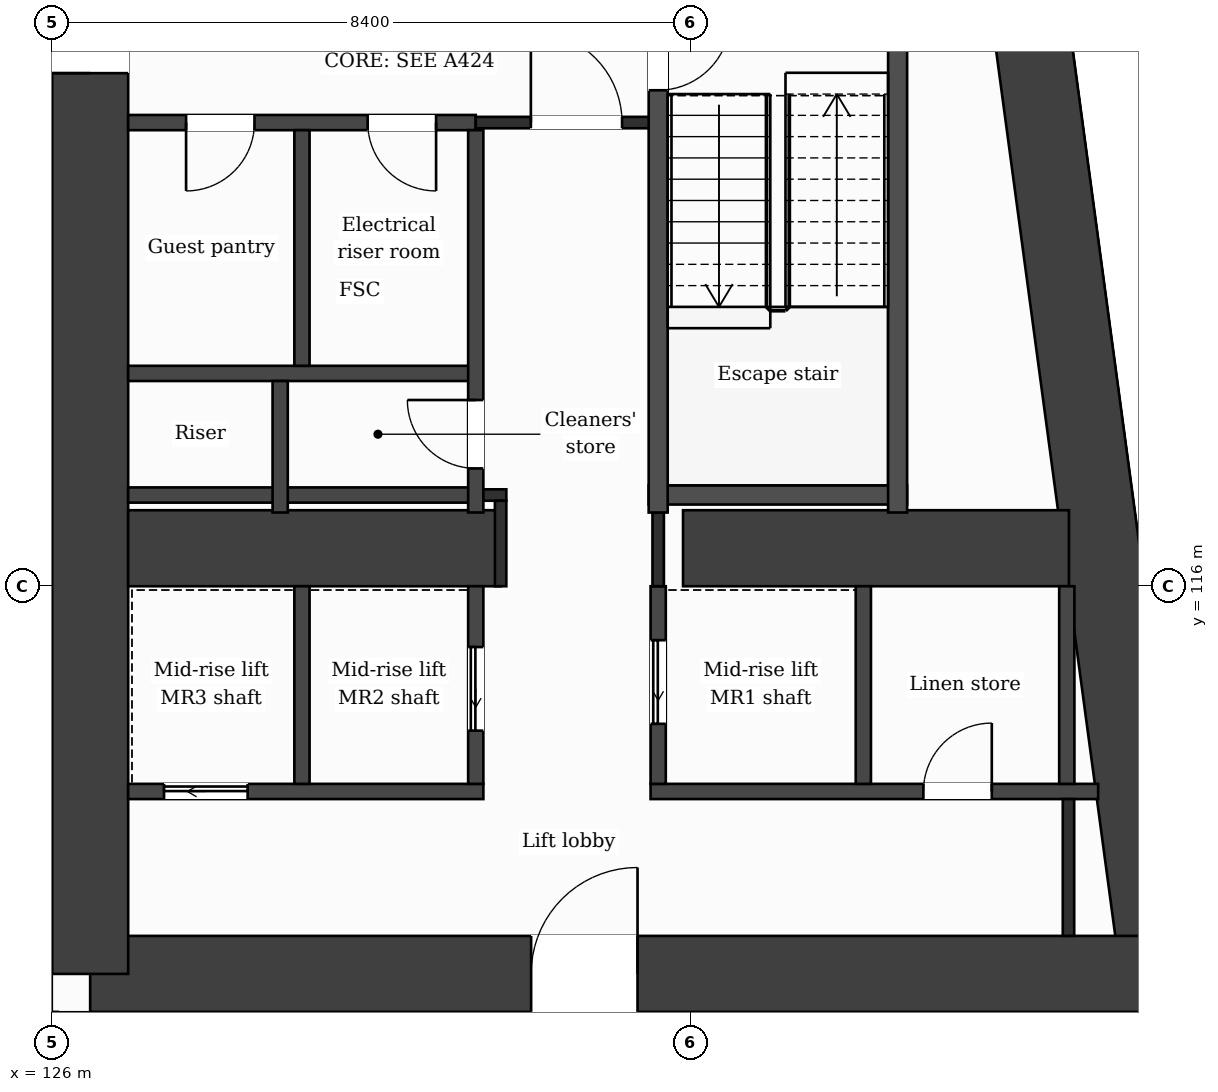
"""IFC4 building model, lengths in metres.
Left out: names, types, materials, properties, quantities, classifications, styles, units other than length and angle.
Written with IfcOpenShell. Run it as: python <this file> out.ifc"""

import sys

from ifc_helpers import new_model, si_unit, direction, frame, frame_2d, origin, place, context, subcontext, project, spatial, rectangle, extrude, element, fill, save


model = new_model("IFC4")
c1 = context("Model", 3, precision=1e-05, world=origin(), true_north=direction((0.0, 1.0)))
c2 = subcontext(c1, "Body", "Model", "MODEL_VIEW")
j1 = project(units=[si_unit("LENGTHUNIT", "METRE"), si_unit("PLANEANGLEUNIT", "RADIAN")], contexts=[c1])
p1 = place(None, origin())
s1 = spatial("IfcSite", under=j1, at=p1, CompositionType="ELEMENT")
p2 = place(p1, origin())
s2 = spatial("IfcBuilding", under=s1, at=p2, CompositionType="ELEMENT")
p3 = place(p2, frame((0.0, 0.0, 102.1)))
s3 = spatial("IfcBuildingStorey", under=s2, at=p3, CompositionType="ELEMENT", Elevation=102.1)
p4 = place(p3, frame((137.732, 131.9, 0.0), z_axis=(0.0, 0.0, 1.0), x_axis=(0.133411141623, -0.991060778808, 0.0)))
e1 = element("IfcWall", 1, at=p4, inside=s3, PredefinedType="SHEAR", context=c2, shape_type="SweptSolid", body=[
    extrude(rectangle(XDim=21.189, YDim=1.0, at=frame_2d((10.595, 0.0))), origin(), (0.0, 0.0, 1.0), 3.7),
])
p5 = place(p3, frame((140.559, 110.9, 0.0), z_axis=(0.0, 0.0, 1.0), x_axis=(-1.0, 0.0, 0.0)))
e2 = element("IfcWall", 2, at=p5, inside=s3, PredefinedType="SHEAR", context=c2, shape_type="SweptSolid", body=[
    extrude(rectangle(XDim=14.059, YDim=1.0, at=frame_2d((7.029, 0.0))), origin(), (0.0, 0.0, 1.0), 3.7),
])
p6 = place(p5, frame((6.858, 0.0, 0.0)))
e3 = element("IfcOpeningElement", 3, at=p6, cuts=e2, PredefinedType="OPENING", context=c2, shape_type="SweptSolid", body=[
    extrude(rectangle(XDim=1.4, YDim=2.1, at=frame_2d((0.7, 1.05))), frame((0.0, 0.51, 0.0), z_axis=(0.0, -1.0, 0.0), x_axis=(1.0, 0.0, 0.0)), (0.0, 0.0, 1.0), 1.02),
])
p7 = place(p3, frame((126.5, 110.9, 0.0), z_axis=(0.0, 0.0, 1.0), x_axis=(0.0, 1.0, 0.0)))
e4 = element("IfcWall", 4, at=p7, inside=s3, PredefinedType="SHEAR", context=c2, shape_type="SweptSolid", body=[
    extrude(rectangle(XDim=21.0, YDim=1.0, at=frame_2d((10.5, 0.0))), origin(), (0.0, 0.0, 1.0), 3.7),
])
p8 = place(p7, frame((11.85, 0.0, 0.0)))
e5 = element("IfcOpeningElement", 5, at=p8, cuts=e4, PredefinedType="OPENING", context=c2, shape_type="SweptSolid", body=[
    extrude(rectangle(XDim=1.4, YDim=2.1, at=frame_2d((0.7, 1.05))), frame((0.0, 0.51, 0.0), z_axis=(0.0, -1.0, 0.0), x_axis=(1.0, 0.0, 0.0)), (0.0, 0.0, 1.0), 1.02),
])
p9 = place(p3, frame((127.0, 116.5, 0.0), z_axis=(0.0, 0.0, 1.0), x_axis=(1.0, 0.0, 0.0)))
e6 = element("IfcWall", 6, at=p9, inside=s3, PredefinedType="SHEAR", context=c2, shape_type="SweptSolid", body=[
    extrude(rectangle(XDim=4.9, YDim=1.0, at=frame_2d((2.45, 0.0))), origin(), (0.0, 0.0, 1.0), 3.7),
])
p10 = place(p3, frame((134.3, 116.5, 0.0), z_axis=(0.0, 0.0, 1.0), x_axis=(1.0, 0.0, 0.0)))
e7 = element("IfcWall", 7, at=p10, inside=s3, PredefinedType="SHEAR", context=c2, shape_type="SweptSolid", body=[
    extrude(rectangle(XDim=5.077, YDim=1.0, at=frame_2d((2.539, 0.0))), origin(), (0.0, 0.0, 1.0), 3.7),
])
p11 = place(p3, frame((140.348, 103.85, 0.0), z_axis=(0.0, 0.0, 1.0), x_axis=(-0.133431549479, 0.991058031401, 0.0)))
e8 = element("IfcWall", 8, at=p11, inside=s3, PredefinedType="SOLIDWALL", context=c2, shape_type="SweptSolid", body=[
    extrude(rectangle(XDim=6.609, YDim=0.3, at=frame_2d((3.304, 0.0))), origin(), (0.0, 0.0, 1.0), 3.38),
])
p12 = place(p11, frame((0.737, 0.0, 0.9)))
e9 = element("IfcOpeningElement", 9, at=p12, cuts=e8, PredefinedType="OPENING", context=c2, shape_type="SweptSolid", body=[
    extrude(rectangle(XDim=1.2, YDim=2.1, at=frame_2d((0.6, 1.05))), frame((0.0, 0.16, 0.0), z_axis=(0.0, -1.0, 0.0), x_axis=(1.0, 0.0, 0.0)), (0.0, 0.0, 1.0), 0.32),
])
p13 = place(p11, frame((3.991, 0.0, 0.0)))
e10 = element("IfcOpeningElement", 10, at=p13, cuts=e8, PredefinedType="OPENING", context=c2, shape_type="SweptSolid", body=[
    extrude(rectangle(XDim=1.2, YDim=2.4, at=frame_2d((0.6, 1.2))), frame((0.0, 0.16, 0.0), z_axis=(0.0, -1.0, 0.0), x_axis=(1.0, 0.0, 0.0)), (0.0, 0.0, 1.0), 0.32),
])
p14 = place(p3, frame((127.0, 113.3, 0.0), z_axis=(0.0, 0.0, 1.0), x_axis=(1.0, 0.0, 0.0)))
e11 = element("IfcWall", 11, at=p14, inside=s3, PredefinedType="PARTITIONING", context=c2, shape_type="SweptSolid", body=[
    extrude(rectangle(XDim=4.673, YDim=0.2, at=frame_2d((2.336, 0.0))), origin(), (0.0, 0.0, 1.0), 3.38),
])
p15 = place(p14, frame((0.472, 0.0, 0.0)))
e12 = element("IfcOpeningElement", 12, at=p15, cuts=e11, PredefinedType="OPENING", context=c2, shape_type="SweptSolid", body=[
    extrude(rectangle(XDim=1.1, YDim=2.1, at=frame_2d((0.55, 1.05))), frame((0.0, 0.11, 0.0), z_axis=(0.0, -1.0, 0.0), x_axis=(1.0, 0.0, 0.0)), (0.0, 0.0, 1.0), 0.22),
])
p16 = place(p3, frame((133.873, 113.3, 0.0), z_axis=(0.0, 0.0, 1.0), x_axis=(1.0, 0.0, 0.0)))
e13 = element("IfcWall", 13, at=p16, inside=s3, PredefinedType="PARTITIONING", context=c2, shape_type="SweptSolid", body=[
    extrude(rectangle(XDim=5.888, YDim=0.2, at=frame_2d((2.944, 0.0))), origin(), (0.0, 0.0, 1.0), 3.38),
])
p17 = place(p16, frame((3.589, 0.0, 0.0)))
e14 = element("IfcOpeningElement", 14, at=p17, cuts=e13, PredefinedType="OPENING", context=c2, shape_type="SweptSolid", body=[
    extrude(rectangle(XDim=0.9, YDim=2.1, at=frame_2d((0.45, 1.05))), frame((0.0, 0.11, 0.0), z_axis=(0.0, -1.0, 0.0), x_axis=(1.0, 0.0, 0.0)), (0.0, 0.0, 1.0), 0.22),
])
p18 = place(p3, frame((127.0, 117.2, 0.0), z_axis=(0.0, 0.0, 1.0), x_axis=(1.0, 0.0, 0.0)))
e15 = element("IfcWall", 15, at=p18, inside=s3, PredefinedType="PARTITIONING", context=c2, shape_type="SweptSolid", body=[
    extrude(rectangle(XDim=4.573, YDim=0.2, at=frame_2d((2.287, 0.0))), origin(), (0.0, 0.0, 1.0), 3.38),
])
p19 = place(p3, frame((131.573, 117.2, 0.0), z_axis=(0.0, 0.0, 1.0), x_axis=(1.0, 0.0, 0.0)))
e16 = element("IfcWall", 16, at=p19, inside=s3, PredefinedType="PARTITIONING", context=c2, shape_type="SweptSolid", body=[
    extrude(rectangle(XDim=0.402, YDim=0.15, at=frame_2d((0.201, 0.0))), origin(), (0.0, 0.0, 1.0), 3.38),
])
p20 = place(p3, frame((133.848, 117.2, 0.0), z_axis=(0.0, 0.0, 1.0), x_axis=(1.0, 0.0, 0.0)))
e17 = element("IfcWall", 17, at=p20, inside=s3, PredefinedType="PARTITIONING", context=c2, shape_type="SweptSolid", body=[
    extrude(rectangle(XDim=3.4, YDim=0.25, at=frame_2d((1.7, 0.0))), origin(), (0.0, 0.0, 1.0), 3.38),
])
p21 = place(p3, frame((127.0, 118.8, 0.0), z_axis=(0.0, 0.0, 1.0), x_axis=(1.0, 0.0, 0.0)))
e18 = element("IfcWall", 18, at=p21, inside=s3, PredefinedType="PARTITIONING", context=c2, shape_type="SweptSolid", body=[
    extrude(rectangle(XDim=4.573, YDim=0.2, at=frame_2d((2.287, 0.0))), origin(), (0.0, 0.0, 1.0), 3.38),
])
p22 = place(p3, frame((127.0, 122.1, 0.0), z_axis=(0.0, 0.0, 1.0), x_axis=(1.0, 0.0, 0.0)))
e19 = element("IfcWall", 19, at=p22, inside=s3, PredefinedType="PARTITIONING", context=c2, shape_type="SweptSolid", body=[
    extrude(rectangle(XDim=4.573, YDim=0.2, at=frame_2d((2.287, 0.0))), origin(), (0.0, 0.0, 1.0), 3.38),
])
p23 = place(p22, frame((3.151, 0.0, 0.0)))
e20 = element("IfcOpeningElement", 20, at=p23, cuts=e19, PredefinedType="OPENING", context=c2, shape_type="SweptSolid", body=[
    extrude(rectangle(XDim=0.9, YDim=2.1, at=frame_2d((0.45, 1.05))), frame((0.0, 0.11, 0.0), z_axis=(0.0, -1.0, 0.0), x_axis=(1.0, 0.0, 0.0)), (0.0, 0.0, 1.0), 0.22),
])
p24 = place(p22, frame((0.762, 0.0, 0.0)))
e21 = element("IfcOpeningElement", 21, at=p24, cuts=e19, PredefinedType="OPENING", context=c2, shape_type="SweptSolid", body=[
    extrude(rectangle(XDim=0.9, YDim=2.1, at=frame_2d((0.45, 1.05))), frame((0.0, 0.11, 0.0), z_axis=(0.0, -1.0, 0.0), x_axis=(1.0, 0.0, 0.0)), (0.0, 0.0, 1.0), 0.22),
])
p25 = place(p3, frame((131.573, 122.1, 0.0), z_axis=(0.0, 0.0, 1.0), x_axis=(1.0, 0.0, 0.0)))
e22 = element("IfcWall", 22, at=p25, inside=s3, PredefinedType="PARTITIONING", context=c2, shape_type="SweptSolid", body=[
    extrude(rectangle(XDim=2.4, YDim=0.15, at=frame_2d((1.2, 0.0))), origin(), (0.0, 0.0, 1.0), 3.38),
])
p26 = place(p25, frame((0.725, 0.0, 0.0)))
e23 = element("IfcOpeningElement", 23, at=p26, cuts=e22, PredefinedType="OPENING", context=c2, shape_type="SweptSolid", body=[
    extrude(rectangle(XDim=1.2, YDim=2.1, at=frame_2d((0.6, 1.05))), frame((0.0, 0.085, 0.0), z_axis=(0.0, -1.0, 0.0), x_axis=(1.0, 0.0, 0.0)), (0.0, 0.0, 1.0), 0.17),
])
p27 = place(p3, frame((100.8, 122.45, 0.0), z_axis=(0.0, 0.0, 1.0), x_axis=(1.0, 0.0, 0.0)))
e24 = element("IfcWall", 24, at=p27, inside=s3, PredefinedType="PARTITIONING", context=c2, shape_type="SweptSolid", body=[
    extrude(rectangle(XDim=25.2, YDim=0.15, at=frame_2d((12.6, 0.0))), origin(), (0.0, 0.0, 1.0), 3.38),
])
p28 = place(p3, frame((126.0, 109.075, 0.0), z_axis=(0.0, 0.0, 1.0), x_axis=(0.0, 1.0, 0.0)))
e25 = element("IfcWall", 25, at=p28, inside=s3, PredefinedType="PARTITIONING", context=c2, shape_type="SweptSolid", body=[
    extrude(rectangle(XDim=1.325, YDim=0.15, at=frame_2d((0.663, 0.0))), origin(), (0.0, 0.0, 1.0), 3.38),
])
p29 = place(p3, frame((129.0, 116.97, 0.0), z_axis=(0.0, 0.0, 1.0), x_axis=(0.0, 1.0, 0.0)))
e26 = element("IfcWall", 26, at=p29, inside=s3, PredefinedType="PARTITIONING", context=c2, shape_type="SweptSolid", body=[
    extrude(rectangle(XDim=1.73, YDim=0.2, at=frame_2d((0.865, 0.0))), origin(), (0.0, 0.0, 1.0), 3.38),
])
p30 = place(p3, frame((129.287, 113.4, 0.0), z_axis=(0.0, 0.0, 1.0), x_axis=(0.0, 1.0, 0.0)))
e27 = element("IfcWall", 27, at=p30, inside=s3, PredefinedType="PARTITIONING", context=c2, shape_type="SweptSolid", body=[
    extrude(rectangle(XDim=2.6, YDim=0.2, at=frame_2d((1.3, 0.0))), origin(), (0.0, 0.0, 1.0), 3.38),
])
p31 = place(p3, frame((129.287, 118.9, 0.0), z_axis=(0.0, 0.0, 1.0), x_axis=(0.0, 1.0, 0.0)))
e28 = element("IfcWall", 28, at=p31, inside=s3, PredefinedType="PARTITIONING", context=c2, shape_type="SweptSolid", body=[
    extrude(rectangle(XDim=3.1, YDim=0.2, at=frame_2d((1.55, 0.0))), origin(), (0.0, 0.0, 1.0), 3.38),
])
p32 = place(p3, frame((131.573, 113.4, 0.0), z_axis=(0.0, 0.0, 1.0), x_axis=(0.0, 1.0, 0.0)))
e29 = element("IfcWall", 29, at=p32, inside=s3, PredefinedType="PARTITIONING", context=c2, shape_type="SweptSolid", body=[
    extrude(rectangle(XDim=2.6, YDim=0.2, at=frame_2d((1.3, 0.0))), origin(), (0.0, 0.0, 1.0), 3.38),
])
p33 = place(p32, frame((0.7, 0.0, 0.0)))
e30 = element("IfcOpeningElement", 30, at=p33, cuts=e29, PredefinedType="OPENING", context=c2, shape_type="SweptSolid", body=[
    extrude(rectangle(XDim=1.1, YDim=2.1, at=frame_2d((0.55, 1.05))), frame((0.0, 0.11, 0.0), z_axis=(0.0, -1.0, 0.0), x_axis=(1.0, 0.0, 0.0)), (0.0, 0.0, 1.0), 0.22),
])
p34 = place(p3, frame((131.573, 116.97, 0.0), z_axis=(0.0, 0.0, 1.0), x_axis=(0.0, 1.0, 0.0)))
e31 = element("IfcWall", 31, at=p34, inside=s3, PredefinedType="PARTITIONING", context=c2, shape_type="SweptSolid", body=[
    extrude(rectangle(XDim=5.03, YDim=0.2, at=frame_2d((2.515, 0.0))), origin(), (0.0, 0.0, 1.0), 3.38),
])
p35 = place(p34, frame((0.58, 0.0, 0.0)))
e32 = element("IfcOpeningElement", 32, at=p35, cuts=e31, PredefinedType="OPENING", context=c2, shape_type="SweptSolid", body=[
    extrude(rectangle(XDim=0.9, YDim=2.1, at=frame_2d((0.45, 1.05))), frame((0.0, 0.11, 0.0), z_axis=(0.0, -1.0, 0.0), x_axis=(1.0, 0.0, 0.0)), (0.0, 0.0, 1.0), 0.22),
])
p36 = place(p3, frame((131.9, 116.0, 0.0), z_axis=(0.0, 0.0, 1.0), x_axis=(0.0, 1.0, 0.0)))
e33 = element("IfcWall", 33, at=p36, inside=s3, PredefinedType="PARTITIONING", context=c2, shape_type="SweptSolid", body=[
    extrude(rectangle(XDim=1.125, YDim=0.15, at=frame_2d((0.562, 0.0))), origin(), (0.0, 0.0, 1.0), 3.38),
])
p37 = place(p3, frame((133.973, 113.4, 0.0), z_axis=(0.0, 0.0, 1.0), x_axis=(0.0, 1.0, 0.0)))
e34 = element("IfcWall", 34, at=p37, inside=s3, PredefinedType="PARTITIONING", context=c2, shape_type="SweptSolid", body=[
    extrude(rectangle(XDim=2.6, YDim=0.2, at=frame_2d((1.3, 0.0))), origin(), (0.0, 0.0, 1.0), 3.38),
])
p38 = place(p37, frame((0.79, 0.0, 0.0)))
e35 = element("IfcOpeningElement", 35, at=p38, cuts=e34, PredefinedType="OPENING", context=c2, shape_type="SweptSolid", body=[
    extrude(rectangle(XDim=1.1, YDim=2.1, at=frame_2d((0.55, 1.05))), frame((0.0, 0.11, 0.0), z_axis=(0.0, -1.0, 0.0), x_axis=(1.0, 0.0, 0.0)), (0.0, 0.0, 1.0), 0.22),
])
p39 = place(p3, frame((133.973, 116.0, 0.0), z_axis=(0.0, 0.0, 1.0), x_axis=(0.0, 1.0, 0.0)))
e36 = element("IfcWall", 36, at=p39, inside=s3, PredefinedType="PARTITIONING", context=c2, shape_type="SweptSolid", body=[
    extrude(rectangle(XDim=0.97, YDim=0.15, at=frame_2d((0.485, 0.0))), origin(), (0.0, 0.0, 1.0), 3.38),
])
p40 = place(p3, frame((133.973, 116.97, 0.0), z_axis=(0.0, 0.0, 1.0), x_axis=(0.0, 1.0, 0.0)))
e37 = element("IfcWall", 37, at=p40, inside=s3, PredefinedType="PARTITIONING", context=c2, shape_type="SweptSolid", body=[
    extrude(rectangle(XDim=6.855, YDim=0.25, at=frame_2d((3.427, 0.0))), origin(), (0.0, 0.0, 1.0), 3.38),
])
p41 = place(p40, frame((5.555, 0.0, 0.0)))
e38 = element("IfcOpeningElement", 38, at=p41, cuts=e37, PredefinedType="OPENING", context=c2, shape_type="SweptSolid", body=[
    extrude(rectangle(XDim=0.95, YDim=2.1, at=frame_2d((0.475, 1.05))), frame((0.0, 0.135, 0.0), z_axis=(0.0, -1.0, 0.0), x_axis=(1.0, 0.0, 0.0)), (0.0, 0.0, 1.0), 0.27),
])
p42 = place(p3, frame((136.672, 113.4, 0.0), z_axis=(0.0, 0.0, 1.0), x_axis=(0.0, 1.0, 0.0)))
e39 = element("IfcWall", 39, at=p42, inside=s3, PredefinedType="PARTITIONING", context=c2, shape_type="SweptSolid", body=[
    extrude(rectangle(XDim=2.6, YDim=0.2, at=frame_2d((1.3, 0.0))), origin(), (0.0, 0.0, 1.0), 3.38),
])
p43 = place(p3, frame((137.123, 116.97, 0.0), z_axis=(0.0, 0.0, 1.0), x_axis=(0.0, 1.0, 0.0)))
e40 = element("IfcWall", 40, at=p43, inside=s3, PredefinedType="PARTITIONING", context=c2, shape_type="SweptSolid", body=[
    extrude(rectangle(XDim=6.855, YDim=0.25, at=frame_2d((3.427, 0.0))), origin(), (0.0, 0.0, 1.0), 3.38),
])
p44 = place(p3, frame((139.349, 113.4, 0.0), z_axis=(0.0, 0.0, 1.0), x_axis=(0.0, 1.0, 0.0)))
e41 = element("IfcWall", 41, at=p44, inside=s3, PredefinedType="PARTITIONING", context=c2, shape_type="SweptSolid", body=[
    extrude(rectangle(XDim=2.6, YDim=0.2, at=frame_2d((1.3, 0.0))), origin(), (0.0, 0.0, 1.0), 3.38),
])
p45 = place(p3, frame((139.371, 111.4, 0.0), z_axis=(0.0, 0.0, 1.0), x_axis=(0.0, 1.0, 0.0)))
e42 = element("IfcWall", 42, at=p45, inside=s3, PredefinedType="PARTITIONING", context=c2, shape_type="SweptSolid", body=[
    extrude(rectangle(XDim=1.8, YDim=0.15, at=frame_2d((0.9, 0.0))), origin(), (0.0, 0.0, 1.0), 3.38),
])
p46 = place(p26, origin())
e43 = element("IfcDoor", 43, at=p46, inside=s3, OperationType="SINGLE_SWING_LEFT", PredefinedType="DOOR", context=c2, shape_type="SweptSolid", body=[
    extrude(rectangle(XDim=1.2, YDim=2.1, at=frame_2d((0.6, 1.05))), frame((0.0, 0.025, 0.0), z_axis=(0.0, -1.0, 0.0), x_axis=(1.0, 0.0, 0.0)), (0.0, 0.0, 1.0), 0.05),
])
fill(e23, e43)
p47 = place(p23, origin())
e44 = element("IfcDoor", 44, at=p47, inside=s3, OperationType="SINGLE_SWING_RIGHT", PredefinedType="DOOR", context=c2, shape_type="SweptSolid", body=[
    extrude(rectangle(XDim=0.9, YDim=2.1, at=frame_2d((0.45, 1.05))), frame((0.0, 0.025, 0.0), z_axis=(0.0, -1.0, 0.0), x_axis=(1.0, 0.0, 0.0)), (0.0, 0.0, 1.0), 0.05),
])
fill(e20, e44)
p48 = place(p24, origin())
e45 = element("IfcDoor", 45, at=p48, inside=s3, OperationType="SINGLE_SWING_LEFT", PredefinedType="DOOR", context=c2, shape_type="SweptSolid", body=[
    extrude(rectangle(XDim=0.9, YDim=2.1, at=frame_2d((0.45, 1.05))), frame((0.0, 0.025, 0.0), z_axis=(0.0, -1.0, 0.0), x_axis=(1.0, 0.0, 0.0)), (0.0, 0.0, 1.0), 0.05),
])
fill(e21, e45)
p49 = place(p41, origin())
e46 = element("IfcDoor", 46, at=p49, inside=s3, OperationType="SINGLE_SWING_RIGHT", PredefinedType="DOOR", context=c2, shape_type="SweptSolid", body=[
    extrude(rectangle(XDim=0.95, YDim=2.1, at=frame_2d((0.475, 1.05))), frame((0.0, 0.025, 0.0), z_axis=(0.0, -1.0, 0.0), x_axis=(1.0, 0.0, 0.0)), (0.0, 0.0, 1.0), 0.05),
])
fill(e38, e46)
p50 = place(p35, origin())
e47 = element("IfcDoor", 47, at=p50, inside=s3, OperationType="SINGLE_SWING_RIGHT", PredefinedType="DOOR", context=c2, shape_type="SweptSolid", body=[
    extrude(rectangle(XDim=0.9, YDim=2.1, at=frame_2d((0.45, 1.05))), frame((0.0, 0.025, 0.0), z_axis=(0.0, -1.0, 0.0), x_axis=(1.0, 0.0, 0.0)), (0.0, 0.0, 1.0), 0.05),
])
fill(e32, e47)
p51 = place(p38, origin())
e48 = element("IfcDoor", 48, at=p51, inside=s3, OperationType="SLIDING_TO_LEFT", PredefinedType="DOOR", context=c2, shape_type="SweptSolid", body=[
    extrude(rectangle(XDim=1.1, YDim=2.1, at=frame_2d((0.55, 1.05))), frame((0.0, 0.025, 0.0), z_axis=(0.0, -1.0, 0.0), x_axis=(1.0, 0.0, 0.0)), (0.0, 0.0, 1.0), 0.05),
])
fill(e35, e48)
p52 = place(p33, origin())
e49 = element("IfcDoor", 49, at=p52, inside=s3, OperationType="SLIDING_TO_LEFT", PredefinedType="DOOR", context=c2, shape_type="SweptSolid", body=[
    extrude(rectangle(XDim=1.1, YDim=2.1, at=frame_2d((0.55, 1.05))), frame((0.0, 0.025, 0.0), z_axis=(0.0, -1.0, 0.0), x_axis=(1.0, 0.0, 0.0)), (0.0, 0.0, 1.0), 0.05),
])
fill(e30, e49)
p53 = place(p15, origin())
e50 = element("IfcDoor", 50, at=p53, inside=s3, OperationType="SLIDING_TO_LEFT", PredefinedType="DOOR", context=c2, shape_type="SweptSolid", body=[
    extrude(rectangle(XDim=1.1, YDim=2.1, at=frame_2d((0.55, 1.05))), frame((0.0, 0.025, 0.0), z_axis=(0.0, -1.0, 0.0), x_axis=(1.0, 0.0, 0.0)), (0.0, 0.0, 1.0), 0.05),
])
fill(e12, e50)
p54 = place(p17, origin())
e51 = element("IfcDoor", 51, at=p54, inside=s3, OperationType="SINGLE_SWING_RIGHT", PredefinedType="DOOR", context=c2, shape_type="SweptSolid", body=[
    extrude(rectangle(XDim=0.9, YDim=2.1, at=frame_2d((0.45, 1.05))), frame((0.0, 0.025, 0.0), z_axis=(0.0, -1.0, 0.0), x_axis=(1.0, 0.0, 0.0)), (0.0, 0.0, 1.0), 0.05),
])
fill(e14, e51)
p55 = place(p6, origin())
e52 = element("IfcDoor", 52, at=p55, inside=s3, OperationType="SINGLE_SWING_LEFT", PredefinedType="DOOR", context=c2, shape_type="SweptSolid", body=[
    extrude(rectangle(XDim=1.4, YDim=2.1, at=frame_2d((0.7, 1.05))), frame((0.0, 0.025, 0.0), z_axis=(0.0, -1.0, 0.0), x_axis=(1.0, 0.0, 0.0)), (0.0, 0.0, 1.0), 0.05),
])
fill(e3, e52)
p56 = place(p8, origin())
e53 = element("IfcDoor", 53, at=p56, inside=s3, OperationType="SINGLE_SWING_LEFT", PredefinedType="DOOR", context=c2, shape_type="SweptSolid", body=[
    extrude(rectangle(XDim=1.4, YDim=2.1, at=frame_2d((0.7, 1.05))), frame((0.0, 0.025, 0.0), z_axis=(0.0, -1.0, 0.0), x_axis=(1.0, 0.0, 0.0)), (0.0, 0.0, 1.0), 0.05),
])
fill(e5, e53)
save(model, sys.argv[1])
